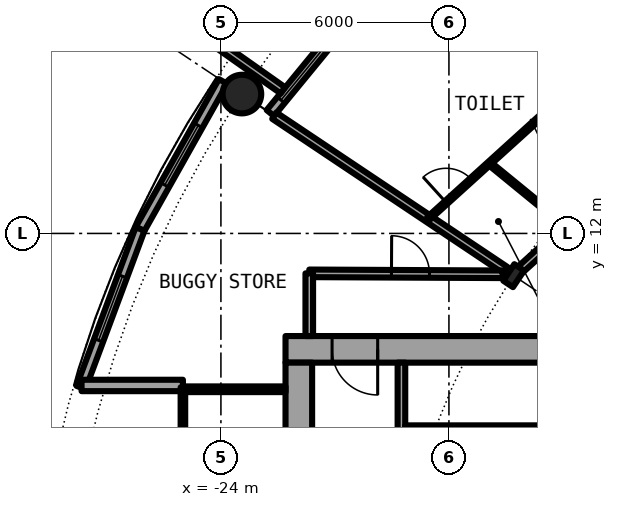
"""IFC4 building model, lengths in metres.
Left out: names, types, materials, properties, quantities, classifications, styles, units other than length and angle.
Written with IfcOpenShell. Run it as: python <this file> out.ifc"""

import sys

from ifc_helpers import new_model, si_unit, direction, frame, frame_2d, origin, origin_2d, place, context, subcontext, project, spatial, rectangle, hollow_circle, i_section, extrude, element, fill, save


model = new_model("IFC4")
c1 = context("Model", 3, precision=1e-05, world=origin(), true_north=direction((0.0, 1.0)))
c2 = subcontext(c1, "Body", "Model", "MODEL_VIEW")
j1 = project(units=[si_unit("LENGTHUNIT", "METRE"), si_unit("PLANEANGLEUNIT", "RADIAN")], contexts=[c1])
p1 = place(None, origin())
s1 = spatial("IfcSite", under=j1, at=p1, CompositionType="ELEMENT")
p2 = place(p1, origin())
s2 = spatial("IfcBuilding", under=s1, at=p2, CompositionType="ELEMENT")
p3 = place(p2, frame((0.0, 0.0, 63.6)))
s3 = spatial("IfcBuildingStorey", under=s2, at=p3, CompositionType="ELEMENT", Elevation=63.6)
p4 = place(p3, frame((-23.448, 15.667, 0.0), z_axis=(0.0, 0.0, 1.0), x_axis=(1.0, 0.0, 0.0)))
e1 = element("IfcColumn", 1, at=p4, inside=s3, PredefinedType="COLUMN", context=c2, shape_type="SweptSolid", body=[
    extrude(hollow_circle(Radius=0.508, WallThickness=0.04, at=origin_2d()), origin(), (0.0, 0.0, 1.0), 3.05),
])
p5 = place(p3, frame((-16.297, 10.889, 0.0), z_axis=(0.0, 0.0, 1.0), x_axis=(-0.831469612303, 0.55557023302, 0.0)))
e2 = element("IfcColumn", 2, at=p5, inside=s3, PredefinedType="COLUMN", context=c2, shape_type="SweptSolid", body=[
    extrude(i_section(OverallWidth=0.306, OverallDepth=0.524, WebThickness=0.021, FlangeThickness=0.04, FilletRadius=0.027, at=origin_2d()), origin(), (0.0, 0.0, 1.0), 3.05),
])
p6 = place(p3, frame((-19.304, 19.304, 0.0), z_axis=(0.0, 0.0, 1.0), x_axis=(-0.634382322723, -0.773019449054, 0.0)))
e3 = element("IfcWall", 3, at=p6, inside=s3, PredefinedType="SOLIDWALL", context=c2, shape_type="SweptSolid", body=[
    extrude(rectangle(XDim=5.352, YDim=0.25, at=frame_2d((2.676, 0.0))), origin(), (0.0, 0.0, 1.0), 2.7),
])
p7 = place(p6, frame((0.841, 0.0, 0.0)))
e4 = element("IfcOpeningElement", 4, at=p7, cuts=e3, PredefinedType="OPENING", context=c2, shape_type="SweptSolid", body=[
    extrude(rectangle(XDim=1.0, YDim=2.2, at=frame_2d((0.5, 1.1))), frame((0.0, 0.135, 0.0), z_axis=(0.0, -1.0, 0.0), x_axis=(1.0, 0.0, 0.0)), (0.0, 0.0, 1.0), 0.27),
])
p8 = place(p6, frame((3.111, 0.0, 0.3)))
e5 = element("IfcOpeningElement", 5, at=p8, cuts=e3, PredefinedType="OPENING", context=c2, shape_type="SweptSolid", body=[
    extrude(rectangle(XDim=1.8, YDim=2.1, at=frame_2d((0.9, 1.05))), frame((0.0, 0.135, 0.0), z_axis=(0.0, -1.0, 0.0), x_axis=(1.0, 0.0, 0.0)), (0.0, 0.0, 1.0), 0.27),
])
p9 = place(p3, frame((-22.37, 15.765, -0.03), z_axis=(0.0, 0.0, 1.0), x_axis=(-0.817256123454, 0.576274612209, 0.0)))
e6 = element("IfcWall", 6, at=p9, inside=s3, PredefinedType="SOLIDWALL", context=c2, shape_type="SweptSolid", body=[
    extrude(rectangle(XDim=2.933, YDim=0.2, at=frame_2d((1.466, 0.0))), origin(), (0.0, 0.0, 1.0), 2.73),
])
p10 = place(p3, frame((-23.946, 16.0, 0.0), z_axis=(0.0, 0.0, 1.0), x_axis=(-0.489696356642, -0.871893042919, 0.0)))
e7 = element("IfcWall", 7, at=p10, inside=s3, PredefinedType="SOLIDWALL", context=c2, shape_type="SweptSolid", body=[
    extrude(rectangle(XDim=4.454, YDim=0.25, at=frame_2d((2.227, 0.0))), origin(), (0.0, 0.0, 1.0), 2.7),
])
p11 = place(p10, frame((1.327, 0.0, 0.3)))
e8 = element("IfcOpeningElement", 8, at=p11, cuts=e7, PredefinedType="OPENING", context=c2, shape_type="SweptSolid", body=[
    extrude(rectangle(XDim=1.8, YDim=2.1, at=frame_2d((0.9, 1.05))), frame((0.0, 0.135, 0.0), z_axis=(0.0, -1.0, 0.0), x_axis=(1.0, 0.0, 0.0)), (0.0, 0.0, 1.0), 0.27),
])
p12 = place(p3, frame((-26.127, 12.117, 0.0), z_axis=(0.0, 0.0, 1.0), x_axis=(-0.349247811493, -0.937030397675, 0.0)))
e9 = element("IfcWall", 9, at=p12, inside=s3, PredefinedType="SOLIDWALL", context=c2, shape_type="SweptSolid", body=[
    extrude(rectangle(XDim=4.452, YDim=0.25, at=frame_2d((2.226, 0.0))), origin(), (0.0, 0.0, 1.0), 2.7),
])
p13 = place(p12, frame((1.327, 0.0, 0.3)))
e10 = element("IfcOpeningElement", 10, at=p13, cuts=e9, PredefinedType="OPENING", context=c2, shape_type="SweptSolid", body=[
    extrude(rectangle(XDim=1.8, YDim=2.1, at=frame_2d((0.9, 1.05))), frame((0.0, 0.135, 0.0), z_axis=(0.0, -1.0, 0.0), x_axis=(1.0, 0.0, 0.0)), (0.0, 0.0, 1.0), 0.27),
])
p14 = place(p3, frame((-25.0, 8.0, 0.0), z_axis=(0.0, 0.0, 1.0), x_axis=(-1.0, 0.0, 0.0)))
e11 = element("IfcWall", 11, at=p14, inside=s3, PredefinedType="SOLIDWALL", context=c2, shape_type="SweptSolid", body=[
    extrude(rectangle(XDim=2.667, YDim=0.3, at=frame_2d((1.333, 0.0))), origin(), (0.0, 0.0, 1.0), 2.7),
])
p15 = place(p3, frame((-8.3, 8.95, 0.0), z_axis=(0.0, 0.0, 1.0), x_axis=(-1.0, 0.0, 0.0)))
e12 = element("IfcWall", 12, at=p15, inside=s3, PredefinedType="SHEAR", context=c2, shape_type="SweptSolid", body=[
    extrude(rectangle(XDim=14.0, YDim=0.7, at=frame_2d((7.0, 0.0))), origin(), (0.0, 0.0, 1.0), 3.05),
])
p16 = place(p15, frame((11.575, 0.0, 0.0)))
e13 = element("IfcOpeningElement", 13, at=p16, cuts=e12, PredefinedType="OPENING", context=c2, shape_type="SweptSolid", body=[
    extrude(rectangle(XDim=1.2, YDim=2.3, at=frame_2d((0.6, 1.15))), frame((0.0, 0.36, 0.0), z_axis=(0.0, -1.0, 0.0), x_axis=(1.0, 0.0, 0.0)), (0.0, 0.0, 1.0), 0.72),
])
p17 = place(p3, frame((-21.95, -8.6, 0.0), z_axis=(0.0, 0.0, 1.0), x_axis=(0.0, 1.0, 0.0)))
e14 = element("IfcWall", 14, at=p17, inside=s3, PredefinedType="SHEAR", context=c2, shape_type="SweptSolid", body=[
    extrude(rectangle(XDim=17.2, YDim=0.7, at=frame_2d((8.6, 0.0))), origin(), (0.0, 0.0, 1.0), 3.05),
])
p18 = place(p17, frame((7.7, 0.0, 0.0)))
e15 = element("IfcOpeningElement", 15, at=p18, cuts=e14, PredefinedType="OPENING", context=c2, shape_type="SweptSolid", body=[
    extrude(rectangle(XDim=1.8, YDim=2.3, at=frame_2d((0.9, 1.15))), frame((0.0, 0.36, 0.0), z_axis=(0.0, -1.0, 0.0), x_axis=(1.0, 0.0, 0.0)), (0.0, 0.0, 1.0), 0.72),
])
p19 = place(p3, frame((-19.25, 8.6, 0.0), z_axis=(0.0, 0.0, 1.0), x_axis=(0.0, -1.0, 0.0)))
e16 = element("IfcWall", 16, at=p19, inside=s3, PredefinedType="SOLIDWALL", context=c2, shape_type="SweptSolid", body=[
    extrude(rectangle(XDim=7.025, YDim=0.2, at=frame_2d((3.513, 0.0))), origin(), (0.0, 0.0, 1.0), 2.7),
])
p20 = place(p19, frame((2.35, 0.0, 0.0)))
e17 = element("IfcOpeningElement", 17, at=p20, cuts=e16, PredefinedType="OPENING", context=c2, shape_type="SweptSolid", body=[
    extrude(rectangle(XDim=1.1, YDim=2.3, at=frame_2d((0.55, 1.15))), frame((0.0, 0.11, 0.0), z_axis=(0.0, -1.0, 0.0), x_axis=(1.0, 0.0, 0.0)), (0.0, 0.0, 1.0), 0.22),
])
p21 = place(p3, frame((-15.45, 6.875, 0.0), z_axis=(0.0, 0.0, 1.0), x_axis=(-1.0, 0.0, 0.0)))
e18 = element("IfcWall", 18, at=p21, inside=s3, PredefinedType="PARTITIONING", context=c2, shape_type="SweptSolid", body=[
    extrude(rectangle(XDim=3.7, YDim=0.15, at=frame_2d((1.85, 0.0))), origin(), (0.0, 0.0, 1.0), 2.7),
])
p22 = place(p21, frame((1.4, 0.0, 0.0)))
e19 = element("IfcOpeningElement", 19, at=p22, cuts=e18, PredefinedType="OPENING", context=c2, shape_type="SweptSolid", body=[
    extrude(rectangle(XDim=0.9, YDim=2.3, at=frame_2d((0.45, 1.15))), frame((0.0, 0.085, 0.0), z_axis=(0.0, -1.0, 0.0), x_axis=(1.0, 0.0, 0.0)), (0.0, 0.0, 1.0), 0.17),
])
p23 = place(p3, frame((-22.3, 7.9, 0.0), z_axis=(0.0, 0.0, 1.0), x_axis=(-1.0, 0.0, 0.0)))
e20 = element("IfcWall", 20, at=p23, inside=s3, PredefinedType="PARTITIONING", context=c2, shape_type="SweptSolid", body=[
    extrude(rectangle(XDim=2.64, YDim=0.15, at=frame_2d((1.32, 0.0))), origin(), (0.0, 0.0, 1.0), 2.7),
])
p24 = place(p3, frame((-25.0, -7.95, 0.0), z_axis=(0.0, 0.0, 1.0), x_axis=(0.0, 1.0, 0.0)))
e21 = element("IfcWall", 21, at=p24, inside=s3, PredefinedType="PARTITIONING", context=c2, shape_type="SweptSolid", body=[
    extrude(rectangle(XDim=15.9, YDim=0.12, at=frame_2d((7.95, 0.0))), origin(), (0.0, 0.0, 1.0), 2.7),
])
p25 = place(p24, frame((6.75, 0.0, 0.0)))
e22 = element("IfcOpeningElement", 22, at=p25, cuts=e21, PredefinedType="OPENING", context=c2, shape_type="SweptSolid", body=[
    extrude(rectangle(XDim=2.4, YDim=2.3, at=frame_2d((1.2, 1.15))), frame((0.0, 0.07, 0.0), z_axis=(0.0, -1.0, 0.0), x_axis=(1.0, 0.0, 0.0)), (0.0, 0.0, 1.0), 0.14),
])
p26 = place(p24, frame((11.55, 0.0, 0.1)))
e23 = element("IfcOpeningElement", 23, at=p26, cuts=e21, PredefinedType="OPENING", context=c2, shape_type="SweptSolid", body=[
    extrude(rectangle(XDim=3.4, YDim=2.35, at=frame_2d((1.7, 1.175))), frame((0.0, 0.07, 0.0), z_axis=(0.0, -1.0, 0.0), x_axis=(1.0, 0.0, 0.0)), (0.0, 0.0, 1.0), 0.14),
])
p27 = place(p24, frame((0.95, 0.0, 0.1)))
e24 = element("IfcOpeningElement", 24, at=p27, cuts=e21, PredefinedType="OPENING", context=c2, shape_type="SweptSolid", body=[
    extrude(rectangle(XDim=3.4, YDim=2.35, at=frame_2d((1.7, 1.175))), frame((0.0, 0.07, 0.0), z_axis=(0.0, -1.0, 0.0), x_axis=(1.0, 0.0, 0.0)), (0.0, 0.0, 1.0), 0.14),
])
p28 = place(p3, frame((-22.595, 15.098, 0.0), z_axis=(0.0, 0.0, 1.0), x_axis=(0.831382022135, -0.555701298605, 0.0)))
e25 = element("IfcWall", 25, at=p28, inside=s3, PredefinedType="PARTITIONING", context=c2, shape_type="SweptSolid", body=[
    extrude(rectangle(XDim=7.313, YDim=0.2, at=frame_2d((3.657, 0.0))), origin(), (0.0, 0.0, 1.0), 2.7),
])
p29 = place(p3, frame((-17.219, 21.023, 0.0), z_axis=(0.0, 0.0, 1.0), x_axis=(0.633664062855, -0.773608334654, 0.0)))
e26 = element("IfcWall", 26, at=p29, inside=s3, PredefinedType="PARTITIONING", context=c2, shape_type="SweptSolid", body=[
    extrude(rectangle(XDim=8.138, YDim=0.1, at=frame_2d((4.069, 0.0))), origin(), (0.0, 0.0, 1.0), 2.7),
])
p30 = place(p29, frame((6.377, 0.0, 0.0)))
e27 = element("IfcOpeningElement", 27, at=p30, cuts=e26, PredefinedType="OPENING", context=c2, shape_type="SweptSolid", body=[
    extrude(rectangle(XDim=0.9, YDim=2.3, at=frame_2d((0.45, 1.15))), frame((0.0, 0.06, 0.0), z_axis=(0.0, -1.0, 0.0), x_axis=(1.0, 0.0, 0.0)), (0.0, 0.0, 1.0), 0.12),
])
p31 = place(p29, frame((2.308, 0.0, 0.0)))
e28 = element("IfcOpeningElement", 28, at=p31, cuts=e26, PredefinedType="OPENING", context=c2, shape_type="SweptSolid", body=[
    extrude(rectangle(XDim=0.9, YDim=2.3, at=frame_2d((0.45, 1.15))), frame((0.0, 0.06, 0.0), z_axis=(0.0, -1.0, 0.0), x_axis=(1.0, 0.0, 0.0)), (0.0, 0.0, 1.0), 0.12),
])
p32 = place(p3, frame((-16.936, 13.845, 0.0), z_axis=(0.0, 0.0, 1.0), x_axis=(0.774162545943, -0.632986850147, 0.0)))
e29 = element("IfcWall", 29, at=p32, inside=s3, PredefinedType="PARTITIONING", context=c2, shape_type="SweptSolid", body=[
    extrude(rectangle(XDim=2.649, YDim=0.1, at=frame_2d((1.325, 0.0))), origin(), (0.0, 0.0, 1.0), 2.7),
])
p33 = place(p3, frame((-21.675, 10.95, 0.0), z_axis=(0.0, 0.0, 1.0), x_axis=(0.999988019025, -0.004895079807, 0.0)))
e30 = element("IfcWall", 30, at=p33, inside=s3, PredefinedType="PARTITIONING", context=c2, shape_type="SweptSolid", body=[
    extrude(rectangle(XDim=5.087, YDim=0.2, at=frame_2d((2.543, 0.0))), origin(), (0.0, 0.0, 1.0), 2.7),
])
p34 = place(p33, frame((2.163, 0.0, 0.0)))
e31 = element("IfcOpeningElement", 31, at=p34, cuts=e30, PredefinedType="OPENING", context=c2, shape_type="SweptSolid", body=[
    extrude(rectangle(XDim=1.0, YDim=2.3, at=frame_2d((0.5, 1.15))), frame((0.0, 0.11, 0.0), z_axis=(0.0, -1.0, 0.0), x_axis=(1.0, 0.0, 0.0)), (0.0, 0.0, 1.0), 0.22),
])
p35 = place(p3, frame((-16.18, 10.995, 0.0), z_axis=(0.0, 0.0, 1.0), x_axis=(0.741086986457, 0.671409024741, 0.0)))
e32 = element("IfcWall", 32, at=p35, inside=s3, PredefinedType="PARTITIONING", context=c2, shape_type="SweptSolid", body=[
    extrude(rectangle(XDim=9.373, YDim=0.2, at=frame_2d((4.687, 0.0))), origin(), (0.0, 0.0, 1.0), 2.38),
])
p36 = place(p35, frame((4.115, 0.0, 0.0)))
e33 = element("IfcOpeningElement", 33, at=p36, cuts=e32, PredefinedType="OPENING", context=c2, shape_type="SweptSolid", body=[
    extrude(rectangle(XDim=1.0, YDim=2.3, at=frame_2d((0.5, 1.15))), frame((0.0, 0.11, 0.0), z_axis=(0.0, -1.0, 0.0), x_axis=(1.0, 0.0, 0.0)), (0.0, 0.0, 1.0), 0.22),
])
p37 = place(p3, frame((-18.54, 12.392, 0.0), z_axis=(0.0, 0.0, 1.0), x_axis=(0.741109646243, 0.671384012504, 0.0)))
e34 = element("IfcWall", 34, at=p37, inside=s3, PredefinedType="PARTITIONING", context=c2, shape_type="SweptSolid", body=[
    extrude(rectangle(XDim=4.331, YDim=0.1, at=frame_2d((2.166, 0.0))), origin(), (0.0, 0.0, 1.0), 2.7),
])
p38 = place(p37, frame((0.629, 0.0, 0.0)))
e35 = element("IfcOpeningElement", 35, at=p38, cuts=e34, PredefinedType="OPENING", context=c2, shape_type="SweptSolid", body=[
    extrude(rectangle(XDim=0.9, YDim=2.3, at=frame_2d((0.45, 1.15))), frame((0.0, 0.06, 0.0), z_axis=(0.0, -1.0, 0.0), x_axis=(1.0, 0.0, 0.0)), (0.0, 0.0, 1.0), 0.12),
])
p39 = place(p3, frame((-21.675, 9.3, 0.0), z_axis=(0.0, 0.0, 1.0), x_axis=(0.0, 1.0, 0.0)))
e36 = element("IfcWall", 36, at=p39, inside=s3, PredefinedType="PARTITIONING", context=c2, shape_type="SweptSolid", body=[
    extrude(rectangle(XDim=1.65, YDim=0.2, at=frame_2d((0.825, 0.0))), origin(), (0.0, 0.0, 1.0), 2.7),
])
p40 = place(p8, origin())
e37 = element("IfcWindow", 37, at=p40, inside=s3, PartitioningType="SINGLE_PANEL", PredefinedType="WINDOW", context=c2, shape_type="SweptSolid", body=[
    extrude(rectangle(XDim=1.8, YDim=2.1, at=frame_2d((0.9, 1.05))), frame((0.0, 0.03, 0.0), z_axis=(0.0, -1.0, 0.0), x_axis=(1.0, 0.0, 0.0)), (0.0, 0.0, 1.0), 0.06),
])
fill(e5, e37)
p41 = place(p11, origin())
e38 = element("IfcWindow", 38, at=p41, inside=s3, PartitioningType="SINGLE_PANEL", PredefinedType="WINDOW", context=c2, shape_type="SweptSolid", body=[
    extrude(rectangle(XDim=1.8, YDim=2.1, at=frame_2d((0.9, 1.05))), frame((0.0, 0.03, 0.0), z_axis=(0.0, -1.0, 0.0), x_axis=(1.0, 0.0, 0.0)), (0.0, 0.0, 1.0), 0.06),
])
fill(e8, e38)
p42 = place(p13, origin())
e39 = element("IfcWindow", 39, at=p42, inside=s3, PartitioningType="SINGLE_PANEL", PredefinedType="WINDOW", context=c2, shape_type="SweptSolid", body=[
    extrude(rectangle(XDim=1.8, YDim=2.1, at=frame_2d((0.9, 1.05))), frame((0.0, 0.03, 0.0), z_axis=(0.0, -1.0, 0.0), x_axis=(1.0, 0.0, 0.0)), (0.0, 0.0, 1.0), 0.06),
])
fill(e10, e39)
p43 = place(p22, origin())
e40 = element("IfcDoor", 40, at=p43, inside=s3, OperationType="SINGLE_SWING_LEFT", PredefinedType="DOOR", context=c2, shape_type="SweptSolid", body=[
    extrude(rectangle(XDim=0.9, YDim=2.3, at=frame_2d((0.45, 1.15))), frame((0.0, 0.025, 0.0), z_axis=(0.0, -1.0, 0.0), x_axis=(1.0, 0.0, 0.0)), (0.0, 0.0, 1.0), 0.05),
])
fill(e19, e40)
p44 = place(p16, origin())
e41 = element("IfcDoor", 41, at=p44, inside=s3, OperationType="SINGLE_SWING_LEFT", PredefinedType="DOOR", context=c2, shape_type="SweptSolid", body=[
    extrude(rectangle(XDim=1.2, YDim=2.3, at=frame_2d((0.6, 1.15))), frame((0.0, 0.025, 0.0), z_axis=(0.0, -1.0, 0.0), x_axis=(1.0, 0.0, 0.0)), (0.0, 0.0, 1.0), 0.05),
])
fill(e13, e41)
p45 = place(p26, origin())
e42 = element("IfcWindow", 42, at=p45, inside=s3, PartitioningType="SINGLE_PANEL", PredefinedType="WINDOW", context=c2, shape_type="SweptSolid", body=[
    extrude(rectangle(XDim=3.4, YDim=2.35, at=frame_2d((1.7, 1.175))), frame((0.0, 0.03, 0.0), z_axis=(0.0, -1.0, 0.0), x_axis=(1.0, 0.0, 0.0)), (0.0, 0.0, 1.0), 0.06),
])
fill(e23, e42)
p46 = place(p38, origin())
e43 = element("IfcDoor", 43, at=p46, inside=s3, OperationType="SINGLE_SWING_LEFT", PredefinedType="DOOR", context=c2, shape_type="SweptSolid", body=[
    extrude(rectangle(XDim=0.9, YDim=2.3, at=frame_2d((0.45, 1.15))), frame((0.0, 0.025, 0.0), z_axis=(0.0, -1.0, 0.0), x_axis=(1.0, 0.0, 0.0)), (0.0, 0.0, 1.0), 0.05),
])
fill(e35, e43)
p47 = place(p34, origin())
e44 = element("IfcDoor", 44, at=p47, inside=s3, OperationType="SINGLE_SWING_RIGHT", PredefinedType="DOOR", context=c2, shape_type="SweptSolid", body=[
    extrude(rectangle(XDim=1.0, YDim=2.3, at=frame_2d((0.5, 1.15))), frame((0.0, 0.025, 0.0), z_axis=(0.0, -1.0, 0.0), x_axis=(1.0, 0.0, 0.0)), (0.0, 0.0, 1.0), 0.05),
])
fill(e31, e44)
save(model, sys.argv[1])
